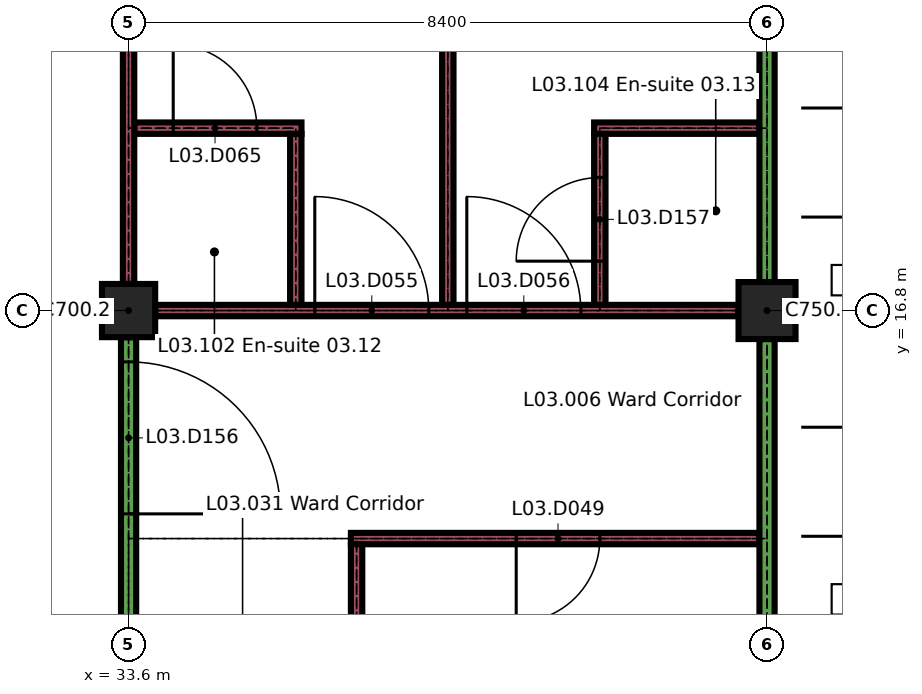
"""IFC4 building model, lengths in metres.
Left out: names, types, materials, properties, quantities, classifications, styles, units other than length and angle.
Written with IfcOpenShell. Run it as: python <this file> out.ifc"""

import sys

from ifc_helpers import new_model, si_unit, direction, frame, frame_2d, origin, origin_2d, place, context, subcontext, project, spatial, rectangle, extrude, element, fill, save


model = new_model("IFC4")
c1 = context("Model", 3, precision=1e-05, world=origin(), true_north=direction((0.0, 1.0)))
c2 = subcontext(c1, "Body", "Model", "MODEL_VIEW")
j1 = project(units=[si_unit("LENGTHUNIT", "METRE"), si_unit("PLANEANGLEUNIT", "RADIAN")], contexts=[c1])
p1 = place(None, origin())
s1 = spatial("IfcSite", under=j1, at=p1, CompositionType="ELEMENT")
p2 = place(p1, origin())
s2 = spatial("IfcBuilding", under=s1, at=p2, CompositionType="ELEMENT")
p3 = place(p2, frame((0.0, 0.0, 15.3)))
s3 = spatial("IfcBuildingStorey", under=s2, at=p3, CompositionType="ELEMENT", Elevation=15.3)
p4 = place(p3, frame((33.6, 16.8, 0.0), z_axis=(0.0, 0.0, 1.0), x_axis=(1.0, 0.0, 0.0)))
e1 = element("IfcColumn", 1, at=p4, inside=s3, PredefinedType="COLUMN", context=c2, shape_type="SweptSolid", body=[
    extrude(rectangle(XDim=0.7, YDim=0.7, at=origin_2d()), origin(), (0.0, 0.0, 1.0), 3.26),
])
p5 = place(p3, frame((42.0, 16.8, 0.0), z_axis=(0.0, 0.0, 1.0), x_axis=(1.0, 0.0, 0.0)))
e2 = element("IfcColumn", 2, at=p5, inside=s3, PredefinedType="COLUMN", context=c2, shape_type="SweptSolid", body=[
    extrude(rectangle(XDim=0.75, YDim=0.75, at=origin_2d()), origin(), (0.0, 0.0, 1.0), 3.26),
])
p6 = place(p3, frame((42.0, 16.8, 4.904), z_axis=(0.0, 0.0, 1.0), x_axis=(1.0, 0.0, 0.0)))
e3 = element("IfcWall", 3, at=p6, inside=s3, PredefinedType="SOLIDWALL", context=c2, shape_type="SweptSolid", body=[
    extrude(rectangle(XDim=58.8, YDim=0.2, at=frame_2d((29.4, 0.0))), origin(), (0.0, 0.0, 1.0), 2.539),
])
p7 = place(p6, frame((1.05, 0.0, 0.3)))
e4 = element("IfcOpeningElement", 4, at=p7, cuts=e3, PredefinedType="OPENING", context=c2, shape_type="SweptSolid", body=[
    extrude(rectangle(XDim=2.1, YDim=1.8, at=frame_2d((1.05, 0.9))), frame((0.0, 0.11, 0.0), z_axis=(0.0, -1.0, 0.0), x_axis=(1.0, 0.0, 0.0)), (0.0, 0.0, 1.0), 0.22),
])
p8 = place(p6, frame((5.25, 0.0, 0.3)))
e5 = element("IfcOpeningElement", 5, at=p8, cuts=e3, PredefinedType="OPENING", context=c2, shape_type="SweptSolid", body=[
    extrude(rectangle(XDim=2.1, YDim=1.8, at=frame_2d((1.05, 0.9))), frame((0.0, 0.11, 0.0), z_axis=(0.0, -1.0, 0.0), x_axis=(1.0, 0.0, 0.0)), (0.0, 0.0, 1.0), 0.22),
])
p9 = place(p6, frame((9.45, 0.0, 0.3)))
e6 = element("IfcOpeningElement", 6, at=p9, cuts=e3, PredefinedType="OPENING", context=c2, shape_type="SweptSolid", body=[
    extrude(rectangle(XDim=2.1, YDim=1.8, at=frame_2d((1.05, 0.9))), frame((0.0, 0.11, 0.0), z_axis=(0.0, -1.0, 0.0), x_axis=(1.0, 0.0, 0.0)), (0.0, 0.0, 1.0), 0.22),
])
p10 = place(p6, frame((13.65, 0.0, 0.3)))
e7 = element("IfcOpeningElement", 7, at=p10, cuts=e3, PredefinedType="OPENING", context=c2, shape_type="SweptSolid", body=[
    extrude(rectangle(XDim=2.1, YDim=1.8, at=frame_2d((1.05, 0.9))), frame((0.0, 0.11, 0.0), z_axis=(0.0, -1.0, 0.0), x_axis=(1.0, 0.0, 0.0)), (0.0, 0.0, 1.0), 0.22),
])
p11 = place(p6, frame((17.85, 0.0, 0.3)))
e8 = element("IfcOpeningElement", 8, at=p11, cuts=e3, PredefinedType="OPENING", context=c2, shape_type="SweptSolid", body=[
    extrude(rectangle(XDim=2.1, YDim=1.8, at=frame_2d((1.05, 0.9))), frame((0.0, 0.11, 0.0), z_axis=(0.0, -1.0, 0.0), x_axis=(1.0, 0.0, 0.0)), (0.0, 0.0, 1.0), 0.22),
])
p12 = place(p6, frame((22.05, 0.0, 0.3)))
e9 = element("IfcOpeningElement", 9, at=p12, cuts=e3, PredefinedType="OPENING", context=c2, shape_type="SweptSolid", body=[
    extrude(rectangle(XDim=2.1, YDim=1.8, at=frame_2d((1.05, 0.9))), frame((0.0, 0.11, 0.0), z_axis=(0.0, -1.0, 0.0), x_axis=(1.0, 0.0, 0.0)), (0.0, 0.0, 1.0), 0.22),
])
p13 = place(p6, frame((26.25, 0.0, 0.3)))
e10 = element("IfcOpeningElement", 10, at=p13, cuts=e3, PredefinedType="OPENING", context=c2, shape_type="SweptSolid", body=[
    extrude(rectangle(XDim=2.1, YDim=1.8, at=frame_2d((1.05, 0.9))), frame((0.0, 0.11, 0.0), z_axis=(0.0, -1.0, 0.0), x_axis=(1.0, 0.0, 0.0)), (0.0, 0.0, 1.0), 0.22),
])
p14 = place(p6, frame((30.45, 0.0, 0.3)))
e11 = element("IfcOpeningElement", 11, at=p14, cuts=e3, PredefinedType="OPENING", context=c2, shape_type="SweptSolid", body=[
    extrude(rectangle(XDim=2.1, YDim=1.8, at=frame_2d((1.05, 0.9))), frame((0.0, 0.11, 0.0), z_axis=(0.0, -1.0, 0.0), x_axis=(1.0, 0.0, 0.0)), (0.0, 0.0, 1.0), 0.22),
])
p15 = place(p6, frame((34.65, 0.0, 0.3)))
e12 = element("IfcOpeningElement", 12, at=p15, cuts=e3, PredefinedType="OPENING", context=c2, shape_type="SweptSolid", body=[
    extrude(rectangle(XDim=2.1, YDim=1.8, at=frame_2d((1.05, 0.9))), frame((0.0, 0.11, 0.0), z_axis=(0.0, -1.0, 0.0), x_axis=(1.0, 0.0, 0.0)), (0.0, 0.0, 1.0), 0.22),
])
p16 = place(p6, frame((38.85, 0.0, 0.3)))
e13 = element("IfcOpeningElement", 13, at=p16, cuts=e3, PredefinedType="OPENING", context=c2, shape_type="SweptSolid", body=[
    extrude(rectangle(XDim=2.1, YDim=1.8, at=frame_2d((1.05, 0.9))), frame((0.0, 0.11, 0.0), z_axis=(0.0, -1.0, 0.0), x_axis=(1.0, 0.0, 0.0)), (0.0, 0.0, 1.0), 0.22),
])
p17 = place(p6, frame((43.05, 0.0, 0.3)))
e14 = element("IfcOpeningElement", 14, at=p17, cuts=e3, PredefinedType="OPENING", context=c2, shape_type="SweptSolid", body=[
    extrude(rectangle(XDim=2.1, YDim=1.8, at=frame_2d((1.05, 0.9))), frame((0.0, 0.11, 0.0), z_axis=(0.0, -1.0, 0.0), x_axis=(1.0, 0.0, 0.0)), (0.0, 0.0, 1.0), 0.22),
])
p18 = place(p6, frame((47.25, 0.0, 0.3)))
e15 = element("IfcOpeningElement", 15, at=p18, cuts=e3, PredefinedType="OPENING", context=c2, shape_type="SweptSolid", body=[
    extrude(rectangle(XDim=2.1, YDim=1.8, at=frame_2d((1.05, 0.9))), frame((0.0, 0.11, 0.0), z_axis=(0.0, -1.0, 0.0), x_axis=(1.0, 0.0, 0.0)), (0.0, 0.0, 1.0), 0.22),
])
p19 = place(p6, frame((51.45, 0.0, 0.3)))
e16 = element("IfcOpeningElement", 16, at=p19, cuts=e3, PredefinedType="OPENING", context=c2, shape_type="SweptSolid", body=[
    extrude(rectangle(XDim=2.1, YDim=1.8, at=frame_2d((1.05, 0.9))), frame((0.0, 0.11, 0.0), z_axis=(0.0, -1.0, 0.0), x_axis=(1.0, 0.0, 0.0)), (0.0, 0.0, 1.0), 0.22),
])
p20 = place(p6, frame((55.65, 0.0, 0.3)))
e17 = element("IfcOpeningElement", 17, at=p20, cuts=e3, PredefinedType="OPENING", context=c2, shape_type="SweptSolid", body=[
    extrude(rectangle(XDim=2.1, YDim=1.8, at=frame_2d((1.05, 0.9))), frame((0.0, 0.11, 0.0), z_axis=(0.0, -1.0, 0.0), x_axis=(1.0, 0.0, 0.0)), (0.0, 0.0, 1.0), 0.22),
])
p21 = place(p3, frame((36.525, 13.8, 0.0), z_axis=(0.0, 0.0, 1.0), x_axis=(1.0, 0.0, 0.0)))
e18 = element("IfcWall", 18, at=p21, inside=s3, PredefinedType="PARTITIONING", context=c2, shape_type="SweptSolid", body=[
    extrude(rectangle(XDim=5.375, YDim=0.15, at=frame_2d((2.688, 0.0))), origin(), (0.0, 0.0, 1.0), 3.26),
])
p22 = place(p21, frame((2.175, 0.0, 0.0)))
e19 = element("IfcOpeningElement", 19, at=p22, cuts=e18, PredefinedType="OPENING", context=c2, shape_type="SweptSolid", body=[
    extrude(rectangle(XDim=1.1, YDim=2.1, at=frame_2d((0.55, 1.05))), frame((0.0, 0.085, 0.0), z_axis=(0.0, -1.0, 0.0), x_axis=(1.0, 0.0, 0.0)), (0.0, 0.0, 1.0), 0.17),
])
p23 = place(p3, frame((33.95, 16.8, 0.0), z_axis=(0.0, 0.0, 1.0), x_axis=(1.0, 0.0, 0.0)))
e20 = element("IfcWall", 20, at=p23, inside=s3, PredefinedType="PARTITIONING", context=c2, shape_type="SweptSolid", body=[
    extrude(rectangle(XDim=7.675, YDim=0.15, at=frame_2d((3.837, 0.0))), origin(), (0.0, 0.0, 1.0), 3.26),
])
p24 = place(p23, frame((2.1, 0.0, 0.0)))
e21 = element("IfcOpeningElement", 21, at=p24, cuts=e20, PredefinedType="OPENING", context=c2, shape_type="SweptSolid", body=[
    extrude(rectangle(XDim=1.5, YDim=2.4, at=frame_2d((0.75, 1.2))), frame((0.0, 0.085, 0.0), z_axis=(0.0, -1.0, 0.0), x_axis=(1.0, 0.0, 0.0)), (0.0, 0.0, 1.0), 0.17),
])
p25 = place(p23, frame((4.1, 0.0, 0.0)))
e22 = element("IfcOpeningElement", 22, at=p25, cuts=e20, PredefinedType="OPENING", context=c2, shape_type="SweptSolid", body=[
    extrude(rectangle(XDim=1.5, YDim=2.4, at=frame_2d((0.75, 1.2))), frame((0.0, 0.085, 0.0), z_axis=(0.0, -1.0, 0.0), x_axis=(1.0, 0.0, 0.0)), (0.0, 0.0, 1.0), 0.17),
])
p26 = place(p3, frame((33.675, 19.2, 0.0), z_axis=(0.0, 0.0, 1.0), x_axis=(1.0, 0.0, 0.0)))
e23 = element("IfcWall", 23, at=p26, inside=s3, PredefinedType="PARTITIONING", context=c2, shape_type="SweptSolid", body=[
    extrude(rectangle(XDim=2.2, YDim=0.15, at=frame_2d((1.1, 0.0))), origin(), (0.0, 0.0, 1.0), 3.26),
])
p27 = place(p26, frame((0.512, 0.0, 0.0)))
e24 = element("IfcOpeningElement", 24, at=p27, cuts=e23, PredefinedType="OPENING", context=c2, shape_type="SweptSolid", body=[
    extrude(rectangle(XDim=1.1, YDim=2.1, at=frame_2d((0.55, 1.05))), frame((0.0, 0.085, 0.0), z_axis=(0.0, -1.0, 0.0), x_axis=(1.0, 0.0, 0.0)), (0.0, 0.0, 1.0), 0.17),
])
p28 = place(p3, frame((39.725, 19.2, 0.0), z_axis=(0.0, 0.0, 1.0), x_axis=(1.0, 0.0, 0.0)))
e25 = element("IfcWall", 25, at=p28, inside=s3, PredefinedType="PARTITIONING", context=c2, shape_type="SweptSolid", body=[
    extrude(rectangle(XDim=2.175, YDim=0.15, at=frame_2d((1.087, 0.0))), origin(), (0.0, 0.0, 1.0), 3.26),
])
p29 = place(p3, frame((33.6, 3.6, 0.0), z_axis=(0.0, 0.0, 1.0), x_axis=(0.0, 1.0, 0.0)))
e26 = element("IfcWall", 26, at=p29, inside=s3, PredefinedType="PARTITIONING", context=c2, shape_type="SweptSolid", body=[
    extrude(rectangle(XDim=12.85, YDim=0.2, at=frame_2d((6.425, 0.0))), origin(), (0.0, 0.0, 1.0), 3.26),
])
p30 = place(p29, frame((5.3, 0.0, 0.0)))
e27 = element("IfcOpeningElement", 27, at=p30, cuts=e26, PredefinedType="OPENING", context=c2, shape_type="SweptSolid", body=[
    extrude(rectangle(XDim=2.0, YDim=2.4, at=frame_2d((1.0, 1.2))), frame((0.0, 0.11, 0.0), z_axis=(0.0, -1.0, 0.0), x_axis=(1.0, 0.0, 0.0)), (0.0, 0.0, 1.0), 0.22),
])
p31 = place(p29, frame((10.525, 0.0, 0.0)))
e28 = element("IfcOpeningElement", 28, at=p31, cuts=e26, PredefinedType="OPENING", context=c2, shape_type="SweptSolid", body=[
    extrude(rectangle(XDim=2.0, YDim=2.4, at=frame_2d((1.0, 1.2))), frame((0.0, 0.11, 0.0), z_axis=(0.0, -1.0, 0.0), x_axis=(1.0, 0.0, 0.0)), (0.0, 0.0, 1.0), 0.22),
])
p32 = place(p3, frame((33.6, 17.15, 0.0), z_axis=(0.0, 0.0, 1.0), x_axis=(0.0, 1.0, 0.0)))
e29 = element("IfcWall", 29, at=p32, inside=s3, PredefinedType="PARTITIONING", context=c2, shape_type="SweptSolid", body=[
    extrude(rectangle(XDim=7.7, YDim=0.15, at=frame_2d((3.85, 0.0))), origin(), (0.0, 0.0, 1.0), 3.26),
])
for number, where, z_axis, x_axis in (
    (30, (35.8, 16.875, 0.0), (0.0, 0.0, 1.0), (0.0, 1.0, 0.0)),
    (31, (36.6, 11.475, 0.0), (0.0, 0.0, 1.0), (0.0, 1.0, 0.0)),
):
    element("IfcWall", number, at=place(p3, frame(where, z_axis=z_axis, x_axis=x_axis)), inside=s3, PredefinedType="PARTITIONING", context=c2, shape_type="SweptSolid", body=[
        extrude(rectangle(XDim=2.25, YDim=0.15, at=frame_2d((1.125, 0.0))), origin(), (0.0, 0.0, 1.0), 3.26),
    ])
p33 = place(p3, frame((37.8, 16.875, 0.0), z_axis=(0.0, 0.0, 1.0), x_axis=(0.0, 1.0, 0.0)))
e32 = element("IfcWall", 32, at=p33, inside=s3, PredefinedType="PARTITIONING", context=c2, shape_type="SweptSolid", body=[
    extrude(rectangle(XDim=8.175, YDim=0.15, at=frame_2d((4.087, 0.0))), origin(), (0.0, 0.0, 1.0), 3.26),
])
p34 = place(p3, frame((39.8, 16.875, 0.0), z_axis=(0.0, 0.0, 1.0), x_axis=(0.0, 1.0, 0.0)))
e33 = element("IfcWall", 33, at=p34, inside=s3, PredefinedType="PARTITIONING", context=c2, shape_type="SweptSolid", body=[
    extrude(rectangle(XDim=2.25, YDim=0.15, at=frame_2d((1.125, 0.0))), origin(), (0.0, 0.0, 1.0), 3.26),
])
p35 = place(p34, frame((0.575, 0.0, 0.0)))
e34 = element("IfcOpeningElement", 34, at=p35, cuts=e33, PredefinedType="OPENING", context=c2, shape_type="SweptSolid", body=[
    extrude(rectangle(XDim=1.1, YDim=2.1, at=frame_2d((0.55, 1.05))), frame((0.0, 0.085, 0.0), z_axis=(0.0, -1.0, 0.0), x_axis=(1.0, 0.0, 0.0)), (0.0, 0.0, 1.0), 0.17),
])
p36 = place(p3, frame((42.0, 3.6, 0.0), z_axis=(0.0, 0.0, 1.0), x_axis=(0.0, 1.0, 0.0)))
e35 = element("IfcWall", 35, at=p36, inside=s3, PredefinedType="PARTITIONING", context=c2, shape_type="SweptSolid", body=[
    extrude(rectangle(XDim=12.825, YDim=0.2, at=frame_2d((6.413, 0.0))), origin(), (0.0, 0.0, 1.0), 3.26),
])
p37 = place(p36, frame((1.5, 0.0, 0.0)))
e36 = element("IfcOpeningElement", 36, at=p37, cuts=e35, PredefinedType="OPENING", context=c2, shape_type="SweptSolid", body=[
    extrude(rectangle(XDim=1.8, YDim=2.4, at=frame_2d((0.9, 1.2))), frame((0.0, 0.11, 0.0), z_axis=(0.0, -1.0, 0.0), x_axis=(1.0, 0.0, 0.0)), (0.0, 0.0, 1.0), 0.22),
])
p38 = place(p3, frame((42.0, 17.175, 0.0), z_axis=(0.0, 0.0, 1.0), x_axis=(0.0, 1.0, 0.0)))
e37 = element("IfcWall", 37, at=p38, inside=s3, PredefinedType="PARTITIONING", context=c2, shape_type="SweptSolid", body=[
    extrude(rectangle(XDim=7.65, YDim=0.2, at=frame_2d((3.825, 0.0))), origin(), (0.0, 0.0, 1.0), 3.26),
])
p39 = place(p22, origin())
e38 = element("IfcDoor", 38, at=p39, inside=s3, OperationType="SINGLE_SWING_LEFT", PredefinedType="DOOR", context=c2, shape_type="SweptSolid", body=[
    extrude(rectangle(XDim=1.1, YDim=2.1, at=frame_2d((0.55, 1.05))), frame((0.0, 0.025, 0.0), z_axis=(0.0, -1.0, 0.0), x_axis=(1.0, 0.0, 0.0)), (0.0, 0.0, 1.0), 0.05),
])
fill(e19, e38)
p40 = place(p24, origin())
e39 = element("IfcDoor", 39, at=p40, inside=s3, OperationType="SINGLE_SWING_RIGHT", PredefinedType="DOOR", context=c2, shape_type="SweptSolid", body=[
    extrude(rectangle(XDim=1.5, YDim=2.4, at=frame_2d((0.75, 1.2))), frame((0.0, 0.03, 0.0), z_axis=(0.0, -1.0, 0.0), x_axis=(1.0, 0.0, 0.0)), (0.0, 0.0, 1.0), 0.06),
])
fill(e21, e39)
p41 = place(p25, origin())
e40 = element("IfcDoor", 40, at=p41, inside=s3, OperationType="SINGLE_SWING_RIGHT", PredefinedType="DOOR", context=c2, shape_type="SweptSolid", body=[
    extrude(rectangle(XDim=1.5, YDim=2.4, at=frame_2d((0.75, 1.2))), frame((0.0, 0.03, 0.0), z_axis=(0.0, -1.0, 0.0), x_axis=(1.0, 0.0, 0.0)), (0.0, 0.0, 1.0), 0.06),
])
fill(e22, e40)
p42 = place(p27, origin())
e41 = element("IfcDoor", 41, at=p42, inside=s3, OperationType="SINGLE_SWING_RIGHT", PredefinedType="DOOR", context=c2, shape_type="SweptSolid", body=[
    extrude(rectangle(XDim=1.1, YDim=2.1, at=frame_2d((0.55, 1.05))), frame((0.0, 0.025, 0.0), z_axis=(0.0, -1.0, 0.0), x_axis=(1.0, 0.0, 0.0)), (0.0, 0.0, 1.0), 0.05),
])
fill(e24, e41)
p43 = place(p31, origin())
e42 = element("IfcDoor", 42, at=p43, inside=s3, OperationType="SINGLE_SWING_LEFT", PredefinedType="DOOR", context=c2, shape_type="SweptSolid", body=[
    extrude(rectangle(XDim=2.0, YDim=2.4, at=frame_2d((1.0, 1.2))), frame((0.0, 0.03, 0.0), z_axis=(0.0, -1.0, 0.0), x_axis=(1.0, 0.0, 0.0)), (0.0, 0.0, 1.0), 0.06),
])
fill(e28, e42)
p44 = place(p35, origin())
e43 = element("IfcDoor", 43, at=p44, inside=s3, OperationType="SINGLE_SWING_RIGHT", PredefinedType="DOOR", context=c2, shape_type="SweptSolid", body=[
    extrude(rectangle(XDim=1.1, YDim=2.1, at=frame_2d((0.55, 1.05))), frame((0.0, 0.025, 0.0), z_axis=(0.0, -1.0, 0.0), x_axis=(1.0, 0.0, 0.0)), (0.0, 0.0, 1.0), 0.05),
])
fill(e34, e43)
save(model, sys.argv[1])
